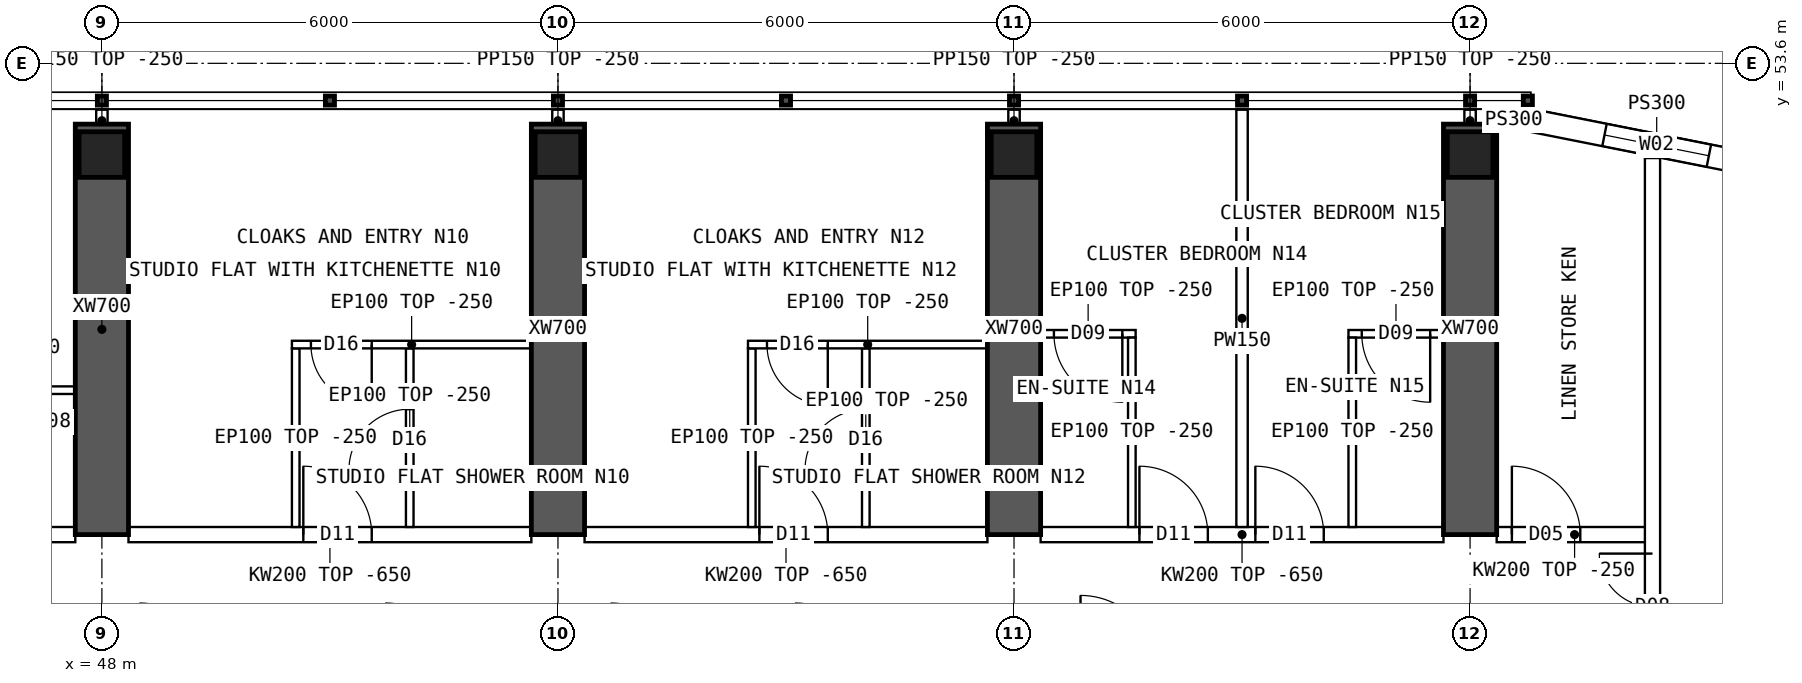
"""IFC4 building model, lengths in metres.
Left out: names, types, materials, properties, quantities, classifications, styles, units other than length and angle.
Written with IfcOpenShell. Run it as: python <this file> out.ifc"""

import sys

from ifc_helpers import new_model, si_unit, direction, frame, frame_2d, origin, origin_2d, place, context, subcontext, project, spatial, polyline, rectangle, hollow_rectangle, outline, extrude, element, fill, save


model = new_model("IFC4")
c1 = context("Model", 3, precision=1e-05, world=origin(), true_north=direction((0.0, 1.0)))
c2 = subcontext(c1, "Body", "Model", "MODEL_VIEW")
j1 = project(units=[si_unit("LENGTHUNIT", "METRE"), si_unit("PLANEANGLEUNIT", "RADIAN")], contexts=[c1])
p1 = place(None, origin())
s1 = spatial("IfcSite", under=j1, at=p1, CompositionType="ELEMENT")
p2 = place(p1, origin())
s2 = spatial("IfcBuilding", under=s1, at=p2, CompositionType="ELEMENT")
p3 = place(p2, frame((0.0, 0.0, 246.55)))
s3 = spatial("IfcBuildingStorey", under=s2, at=p3, CompositionType="ELEMENT", Elevation=246.55)
for number, where, z_axis, x_axis in (
    (1, (48.0, 52.4, 0.0), (0.0, 0.0, 1.0), (1.0, 0.0, 0.0)),
    (2, (54.0, 52.4, 0.0), (0.0, 0.0, 1.0), (1.0, 0.0, 0.0)),
    (3, (60.0, 52.4, 0.0), (0.0, 0.0, 1.0), (1.0, 0.0, 0.0)),
    (4, (66.0, 52.4, 0.0), (0.0, 0.0, 1.0), (1.0, 0.0, 0.0)),
):
    element("IfcColumn", number, at=place(p3, frame(where, z_axis=z_axis, x_axis=x_axis)), inside=s3, PredefinedType="COLUMN", context=c2, shape_type="SweptSolid", body=[
        extrude(hollow_rectangle(XDim=0.6, YDim=0.6, WallThickness=0.06, at=origin_2d()), origin(), (0.0, 0.0, 1.0), 3.75),
    ])
for number, where, z_axis, x_axis in (
    (5, (48.0, 47.4, 0.0), (0.0, 0.0, 1.0), (0.0, 1.0, 0.0)),
    (6, (54.0, 47.4, 0.0), (0.0, 0.0, 1.0), (0.0, 1.0, 0.0)),
    (7, (60.0, 47.4, 0.0), (0.0, 0.0, 1.0), (0.0, 1.0, 0.0)),
    (8, (66.0, 47.4, 0.0), (0.0, 0.0, 1.0), (0.0, 1.0, 0.0)),
):
    element("IfcWall", number, at=place(p3, frame(where, z_axis=z_axis, x_axis=x_axis)), inside=s3, PredefinedType="SHEAR", context=c2, shape_type="SweptSolid", body=[
        extrude(rectangle(XDim=5.4, YDim=0.7, at=frame_2d((2.7, 0.0))), origin(), (0.0, 0.0, 1.0), 3.75),
    ])
p4 = place(p3, frame((70.11, 52.192, 0.0), z_axis=(0.0, 0.0, 1.0), x_axis=(-0.98078325777, 0.195100490205, 0.0)))
e9 = element("IfcWall", 9, at=p4, inside=s3, PredefinedType="SOLIDWALL", context=c2, shape_type="SweptSolid", body=[
    extrude(outline(polyline([(-0.03, -0.15), (3.405, -0.15), (3.345, 0.15), (0.03, 0.15), (-0.03, -0.15)])), origin(), (0.0, 0.0, 1.0), 3.5),
])
p5 = place(p4, frame((0.988, 0.0, 0.9)))
e10 = element("IfcOpeningElement", 10, at=p5, cuts=e9, PredefinedType="OPENING", context=c2, shape_type="SweptSolid", body=[
    extrude(rectangle(XDim=1.4, YDim=1.8, at=frame_2d((0.7, 0.9))), frame((0.0, 0.16, 0.0), z_axis=(0.0, -1.0, 0.0), x_axis=(1.0, 0.0, 0.0)), (0.0, 0.0, 1.0), 0.32),
])
p6 = place(p3, frame((66.8, 52.85, 0.0), z_axis=(0.0, 0.0, 1.0), x_axis=(-1.0, 0.0, 0.0)))
e11 = element("IfcWall", 11, at=p6, inside=s3, PredefinedType="SOLIDWALL", context=c2, shape_type="SweptSolid", body=[
    extrude(rectangle(XDim=0.45, YDim=0.3, at=frame_2d((0.225, 0.0))), origin(), (0.0, 0.0, 1.0), 3.5),
])
p7 = place(p3, frame((42.35, 47.4, 0.0), z_axis=(0.0, 0.0, 1.0), x_axis=(1.0, 0.0, 0.0)))
e12 = element("IfcWall", 12, at=p7, inside=s3, PredefinedType="SOLIDWALL", context=c2, shape_type="SweptSolid", body=[
    extrude(outline(polyline([(0.0, 0.0), (5.3, 0.0), (5.3, 3.1), (0.0, 3.1), (0.0, 0.0)])), frame((0.0, 0.1, 0.0), z_axis=(0.0, -1.0, 0.0), x_axis=(1.0, 0.0, 0.0)), (0.0, 0.0, 1.0), 0.2),
])
p8 = place(p7, frame((0.1, 0.0, 0.0)))
e13 = element("IfcOpeningElement", 13, at=p8, cuts=e12, PredefinedType="OPENING", context=c2, shape_type="SweptSolid", body=[
    extrude(rectangle(XDim=0.9, YDim=2.1, at=frame_2d((0.45, 1.05))), frame((0.0, 0.11, 0.0), z_axis=(0.0, -1.0, 0.0), x_axis=(1.0, 0.0, 0.0)), (0.0, 0.0, 1.0), 0.22),
])
p9 = place(p3, frame((48.35, 47.4, 0.0), z_axis=(0.0, 0.0, 1.0), x_axis=(1.0, 0.0, 0.0)))
e14 = element("IfcWall", 14, at=p9, inside=s3, PredefinedType="SOLIDWALL", context=c2, shape_type="SweptSolid", body=[
    extrude(outline(polyline([(0.0, 0.0), (5.3, 0.0), (5.3, 3.1), (0.0, 3.1), (0.0, 0.0)])), frame((0.0, 0.1, 0.0), z_axis=(0.0, -1.0, 0.0), x_axis=(1.0, 0.0, 0.0)), (0.0, 0.0, 1.0), 0.2),
])
p10 = place(p9, frame((2.3, 0.0, 0.0)))
e15 = element("IfcOpeningElement", 15, at=p10, cuts=e14, PredefinedType="OPENING", context=c2, shape_type="SweptSolid", body=[
    extrude(rectangle(XDim=0.9, YDim=2.1, at=frame_2d((0.45, 1.05))), frame((0.0, 0.11, 0.0), z_axis=(0.0, -1.0, 0.0), x_axis=(1.0, 0.0, 0.0)), (0.0, 0.0, 1.0), 0.22),
])
p11 = place(p3, frame((54.35, 47.4, 0.0), z_axis=(0.0, 0.0, 1.0), x_axis=(1.0, 0.0, 0.0)))
e16 = element("IfcWall", 16, at=p11, inside=s3, PredefinedType="SOLIDWALL", context=c2, shape_type="SweptSolid", body=[
    extrude(outline(polyline([(0.0, 0.0), (5.3, 0.0), (5.3, 3.1), (0.0, 3.1), (0.0, 0.0)])), frame((0.0, 0.1, 0.0), z_axis=(0.0, -1.0, 0.0), x_axis=(1.0, 0.0, 0.0)), (0.0, 0.0, 1.0), 0.2),
])
p12 = place(p11, frame((2.3, 0.0, 0.0)))
e17 = element("IfcOpeningElement", 17, at=p12, cuts=e16, PredefinedType="OPENING", context=c2, shape_type="SweptSolid", body=[
    extrude(rectangle(XDim=0.9, YDim=2.1, at=frame_2d((0.45, 1.05))), frame((0.0, 0.11, 0.0), z_axis=(0.0, -1.0, 0.0), x_axis=(1.0, 0.0, 0.0)), (0.0, 0.0, 1.0), 0.22),
])
p13 = place(p3, frame((60.35, 47.4, 0.0), z_axis=(0.0, 0.0, 1.0), x_axis=(1.0, 0.0, 0.0)))
e18 = element("IfcWall", 18, at=p13, inside=s3, PredefinedType="SOLIDWALL", context=c2, shape_type="SweptSolid", body=[
    extrude(outline(polyline([(0.0, 0.0), (5.3, 0.0), (5.3, 3.1), (0.0, 3.1), (0.0, 0.0)])), frame((0.0, 0.1, 0.0), z_axis=(0.0, -1.0, 0.0), x_axis=(1.0, 0.0, 0.0)), (0.0, 0.0, 1.0), 0.2),
])
p14 = place(p13, frame((1.3, 0.0, 0.0)))
e19 = element("IfcOpeningElement", 19, at=p14, cuts=e18, PredefinedType="OPENING", context=c2, shape_type="SweptSolid", body=[
    extrude(rectangle(XDim=0.9, YDim=2.1, at=frame_2d((0.45, 1.05))), frame((0.0, 0.11, 0.0), z_axis=(0.0, -1.0, 0.0), x_axis=(1.0, 0.0, 0.0)), (0.0, 0.0, 1.0), 0.22),
])
p15 = place(p13, frame((2.825, 0.0, 0.0)))
e20 = element("IfcOpeningElement", 20, at=p15, cuts=e18, PredefinedType="OPENING", context=c2, shape_type="SweptSolid", body=[
    extrude(rectangle(XDim=0.9, YDim=2.1, at=frame_2d((0.45, 1.05))), frame((0.0, 0.11, 0.0), z_axis=(0.0, -1.0, 0.0), x_axis=(1.0, 0.0, 0.0)), (0.0, 0.0, 1.0), 0.22),
])
p16 = place(p3, frame((66.35, 47.4, 0.0), z_axis=(0.0, 0.0, 1.0), x_axis=(1.0, 0.0, 0.0)))
e21 = element("IfcWall", 21, at=p16, inside=s3, PredefinedType="SOLIDWALL", context=c2, shape_type="SweptSolid", body=[
    extrude(rectangle(XDim=2.05, YDim=0.2, at=frame_2d((1.025, 0.0))), origin(), (0.0, 0.0, 1.0), 3.5),
])
p17 = place(p16, frame((0.2, 0.0, 0.0)))
e22 = element("IfcOpeningElement", 22, at=p17, cuts=e21, PredefinedType="OPENING", context=c2, shape_type="SweptSolid", body=[
    extrude(rectangle(XDim=0.9, YDim=2.1, at=frame_2d((0.45, 1.05))), frame((0.0, 0.11, 0.0), z_axis=(0.0, -1.0, 0.0), x_axis=(1.0, 0.0, 0.0)), (0.0, 0.0, 1.0), 0.22),
])
p18 = place(p3, frame((45.1, 49.3, 0.0), z_axis=(0.0, 0.0, 1.0), x_axis=(1.0, 0.0, 0.0)))
e23 = element("IfcWall", 23, at=p18, inside=s3, PredefinedType="PARTITIONING", context=c2, shape_type="SweptSolid", body=[
    extrude(rectangle(XDim=2.55, YDim=0.1, at=frame_2d((1.275, 0.0))), origin(), (0.0, 0.0, 1.0), 3.5),
])
p19 = place(p18, frame((0.825, 0.0, 0.0)))
e24 = element("IfcOpeningElement", 24, at=p19, cuts=e23, PredefinedType="OPENING", context=c2, shape_type="SweptSolid", body=[
    extrude(rectangle(XDim=0.9, YDim=2.1, at=frame_2d((0.45, 1.05))), frame((0.0, 0.06, 0.0), z_axis=(0.0, -1.0, 0.0), x_axis=(1.0, 0.0, 0.0)), (0.0, 0.0, 1.0), 0.12),
])
p20 = place(p3, frame((50.5, 49.9, 0.0), z_axis=(0.0, 0.0, 1.0), x_axis=(1.0, 0.0, 0.0)))
e25 = element("IfcWall", 25, at=p20, inside=s3, PredefinedType="PARTITIONING", context=c2, shape_type="SweptSolid", body=[
    extrude(rectangle(XDim=3.15, YDim=0.1, at=frame_2d((1.575, 0.0))), origin(), (0.0, 0.0, 1.0), 3.5),
])
p21 = place(p20, frame((0.25, 0.0, 0.0)))
e26 = element("IfcOpeningElement", 26, at=p21, cuts=e25, PredefinedType="OPENING", context=c2, shape_type="SweptSolid", body=[
    extrude(rectangle(XDim=0.8, YDim=2.1, at=frame_2d((0.4, 1.05))), frame((0.0, 0.06, 0.0), z_axis=(0.0, -1.0, 0.0), x_axis=(1.0, 0.0, 0.0)), (0.0, 0.0, 1.0), 0.12),
])
p22 = place(p3, frame((50.55, 49.85, 0.0), z_axis=(0.0, 0.0, 1.0), x_axis=(0.0, -1.0, 0.0)))
e27 = element("IfcWall", 27, at=p22, inside=s3, PredefinedType="PARTITIONING", context=c2, shape_type="SweptSolid", body=[
    extrude(outline(polyline([(0.0, 0.0), (2.35, 0.0), (2.35, 3.1), (2.302, 3.1), (2.3, 3.5), (0.0, 3.5), (0.0, 0.0)])), frame((0.0, 0.05, 0.0), z_axis=(0.0, -1.0, 0.0), x_axis=(1.0, 0.0, 0.0)), (0.0, 0.0, 1.0), 0.1),
])
p23 = place(p3, frame((52.05, 49.85, 0.0), z_axis=(0.0, 0.0, 1.0), x_axis=(0.0, -1.0, 0.0)))
e28 = element("IfcWall", 28, at=p23, inside=s3, PredefinedType="PARTITIONING", context=c2, shape_type="SweptSolid", body=[
    extrude(outline(polyline([(0.0, 0.0), (2.35, 0.0), (2.35, 3.1), (2.302, 3.1), (2.3, 3.5), (0.0, 3.5), (0.0, 0.0)])), frame((0.0, 0.05, 0.0), z_axis=(0.0, -1.0, 0.0), x_axis=(1.0, 0.0, 0.0)), (0.0, 0.0, 1.0), 0.1),
])
p24 = place(p23, frame((0.8, 0.0, 0.0)))
e29 = element("IfcOpeningElement", 29, at=p24, cuts=e28, PredefinedType="OPENING", context=c2, shape_type="SweptSolid", body=[
    extrude(rectangle(XDim=0.8, YDim=2.1, at=frame_2d((0.4, 1.05))), frame((0.0, 0.06, 0.0), z_axis=(0.0, -1.0, 0.0), x_axis=(1.0, 0.0, 0.0)), (0.0, 0.0, 1.0), 0.12),
])
p25 = place(p3, frame((56.5, 49.9, 0.0), z_axis=(0.0, 0.0, 1.0), x_axis=(1.0, 0.0, 0.0)))
e30 = element("IfcWall", 30, at=p25, inside=s3, PredefinedType="PARTITIONING", context=c2, shape_type="SweptSolid", body=[
    extrude(rectangle(XDim=3.15, YDim=0.1, at=frame_2d((1.575, 0.0))), origin(), (0.0, 0.0, 1.0), 3.5),
])
p26 = place(p25, frame((0.25, 0.0, 0.0)))
e31 = element("IfcOpeningElement", 31, at=p26, cuts=e30, PredefinedType="OPENING", context=c2, shape_type="SweptSolid", body=[
    extrude(rectangle(XDim=0.8, YDim=2.1, at=frame_2d((0.4, 1.05))), frame((0.0, 0.06, 0.0), z_axis=(0.0, -1.0, 0.0), x_axis=(1.0, 0.0, 0.0)), (0.0, 0.0, 1.0), 0.12),
])
p27 = place(p3, frame((56.55, 49.85, 0.0), z_axis=(0.0, 0.0, 1.0), x_axis=(0.0, -1.0, 0.0)))
e32 = element("IfcWall", 32, at=p27, inside=s3, PredefinedType="PARTITIONING", context=c2, shape_type="SweptSolid", body=[
    extrude(outline(polyline([(0.0, 0.0), (2.35, 0.0), (2.35, 3.1), (2.302, 3.1), (2.3, 3.5), (0.0, 3.5), (0.0, 0.0)])), frame((0.0, 0.05, 0.0), z_axis=(0.0, -1.0, 0.0), x_axis=(1.0, 0.0, 0.0)), (0.0, 0.0, 1.0), 0.1),
])
p28 = place(p3, frame((58.05, 49.85, 0.0), z_axis=(0.0, 0.0, 1.0), x_axis=(0.0, -1.0, 0.0)))
e33 = element("IfcWall", 33, at=p28, inside=s3, PredefinedType="PARTITIONING", context=c2, shape_type="SweptSolid", body=[
    extrude(outline(polyline([(0.0, 0.0), (2.35, 0.0), (2.35, 3.1), (2.302, 3.1), (2.3, 3.5), (0.0, 3.5), (0.0, 0.0)])), frame((0.0, 0.05, 0.0), z_axis=(0.0, -1.0, 0.0), x_axis=(1.0, 0.0, 0.0)), (0.0, 0.0, 1.0), 0.1),
])
p29 = place(p28, frame((0.8, 0.0, 0.0)))
e34 = element("IfcOpeningElement", 34, at=p29, cuts=e33, PredefinedType="OPENING", context=c2, shape_type="SweptSolid", body=[
    extrude(rectangle(XDim=0.8, YDim=2.1, at=frame_2d((0.4, 1.05))), frame((0.0, 0.06, 0.0), z_axis=(0.0, -1.0, 0.0), x_axis=(1.0, 0.0, 0.0)), (0.0, 0.0, 1.0), 0.12),
])
p30 = place(p3, frame((63.0, 52.99, 0.0), z_axis=(0.0, 0.0, 1.0), x_axis=(0.0, -1.0, 0.0)))
e35 = element("IfcWall", 35, at=p30, inside=s3, PredefinedType="PARTITIONING", context=c2, shape_type="SweptSolid", body=[
    extrude(outline(polyline([(0.0, 0.0), (5.49, 0.0), (5.49, 3.1), (5.442, 3.1), (5.44, 3.5), (0.792, 3.5), (0.79, 3.1), (0.392, 3.1), (0.39, 3.5), (0.0, 3.5), (0.0, 0.0)])), frame((0.0, 0.075, 0.0), z_axis=(0.0, -1.0, 0.0), x_axis=(1.0, 0.0, 0.0)), (0.0, 0.0, 1.0), 0.15),
])
p31 = place(p3, frame((60.35, 50.042, 0.0), z_axis=(0.0, 0.0, 1.0), x_axis=(1.0, 0.0, 0.0)))
e36 = element("IfcWall", 36, at=p31, inside=s3, PredefinedType="PARTITIONING", context=c2, shape_type="SweptSolid", body=[
    extrude(rectangle(XDim=1.25, YDim=0.1, at=frame_2d((0.625, 0.0))), origin(), (0.0, 0.0, 1.0), 3.5),
])
p32 = place(p31, frame((0.175, 0.0, 0.0)))
e37 = element("IfcOpeningElement", 37, at=p32, cuts=e36, PredefinedType="OPENING", context=c2, shape_type="SweptSolid", body=[
    extrude(rectangle(XDim=0.9, YDim=2.1, at=frame_2d((0.45, 1.05))), frame((0.0, 0.06, 0.0), z_axis=(0.0, -1.0, 0.0), x_axis=(1.0, 0.0, 0.0)), (0.0, 0.0, 1.0), 0.12),
])
p33 = place(p3, frame((61.55, 49.992, 0.0), z_axis=(0.0, 0.0, 1.0), x_axis=(0.0, -1.0, 0.0)))
e38 = element("IfcWall", 38, at=p33, inside=s3, PredefinedType="PARTITIONING", context=c2, shape_type="SweptSolid", body=[
    extrude(outline(polyline([(0.0, 0.0), (2.492, 0.0), (2.492, 3.1), (2.444, 3.1), (2.442, 3.5), (0.0, 3.5), (0.0, 0.0)])), frame((0.0, 0.05, 0.0), z_axis=(0.0, -1.0, 0.0), x_axis=(1.0, 0.0, 0.0)), (0.0, 0.0, 1.0), 0.1),
])
p34 = place(p3, frame((64.4, 50.042, 0.0), z_axis=(0.0, 0.0, 1.0), x_axis=(1.0, 0.0, 0.0)))
e39 = element("IfcWall", 39, at=p34, inside=s3, PredefinedType="PARTITIONING", context=c2, shape_type="SweptSolid", body=[
    extrude(rectangle(XDim=1.25, YDim=0.1, at=frame_2d((0.625, 0.0))), origin(), (0.0, 0.0, 1.0), 3.5),
])
p35 = place(p34, frame((0.175, 0.0, 0.0)))
e40 = element("IfcOpeningElement", 40, at=p35, cuts=e39, PredefinedType="OPENING", context=c2, shape_type="SweptSolid", body=[
    extrude(rectangle(XDim=0.9, YDim=2.1, at=frame_2d((0.45, 1.05))), frame((0.0, 0.06, 0.0), z_axis=(0.0, -1.0, 0.0), x_axis=(1.0, 0.0, 0.0)), (0.0, 0.0, 1.0), 0.12),
])
p36 = place(p3, frame((64.45, 49.992, 0.0), z_axis=(0.0, 0.0, 1.0), x_axis=(0.0, -1.0, 0.0)))
e41 = element("IfcWall", 41, at=p36, inside=s3, PredefinedType="PARTITIONING", context=c2, shape_type="SweptSolid", body=[
    extrude(outline(polyline([(0.0, 0.0), (2.492, 0.0), (2.492, 3.1), (2.444, 3.1), (2.442, 3.5), (0.0, 3.5), (0.0, 0.0)])), frame((0.0, 0.05, 0.0), z_axis=(0.0, -1.0, 0.0), x_axis=(1.0, 0.0, 0.0)), (0.0, 0.0, 1.0), 0.1),
])
p37 = place(p3, frame((68.4, 11.646, 0.0), z_axis=(0.0, 0.0, 1.0), x_axis=(0.0, 1.0, 0.0)))
e42 = element("IfcWall", 42, at=p37, inside=s3, PredefinedType="SOLIDWALL", context=c2, shape_type="SweptSolid", body=[
    extrude(rectangle(XDim=40.708, YDim=0.2, at=frame_2d((20.354, 0.0))), origin(), (0.0, 0.0, 1.0), 3.5),
])
p38 = place(p37, frame((5.104, 0.0, 0.0)))
e43 = element("IfcOpeningElement", 43, at=p38, cuts=e42, PredefinedType="OPENING", context=c2, shape_type="SweptSolid", body=[
    extrude(rectangle(XDim=1.4, YDim=2.1, at=frame_2d((0.7, 1.05))), frame((0.0, 0.11, 0.0), z_axis=(0.0, -1.0, 0.0), x_axis=(1.0, 0.0, 0.0)), (0.0, 0.0, 1.0), 0.22),
])
p39 = place(p37, frame((34.104, 0.0, 0.0)))
e44 = element("IfcOpeningElement", 44, at=p39, cuts=e42, PredefinedType="OPENING", context=c2, shape_type="SweptSolid", body=[
    extrude(rectangle(XDim=1.4, YDim=2.1, at=frame_2d((0.7, 1.05))), frame((0.0, 0.11, 0.0), z_axis=(0.0, -1.0, 0.0), x_axis=(1.0, 0.0, 0.0)), (0.0, 0.0, 1.0), 0.22),
])
for number, where, z_axis, x_axis in (
    (45, (48.0, 52.7, 0.0), (0.0, 0.0, 1.0), (0.0, 1.0, 0.0)),
    (46, (54.0, 52.7, 0.0), (0.0, 0.0, 1.0), (0.0, 1.0, 0.0)),
    (47, (60.0, 52.7, 0.0), (0.0, 0.0, 1.0), (0.0, 1.0, 0.0)),
    (48, (66.0, 52.7, 0.0), (0.0, 0.0, 1.0), (0.0, 1.0, 0.0)),
):
    element("IfcWall", number, at=place(p3, frame(where, z_axis=z_axis, x_axis=x_axis)), inside=s3, PredefinedType="PARTITIONING", context=c2, shape_type="SweptSolid", body=[
        extrude(rectangle(XDim=0.29, YDim=0.15, at=frame_2d((0.145, 0.0))), origin(), (0.0, 0.0, 1.0), 3.5),
    ])
p40 = place(p5, origin())
e49 = element("IfcWindow", 49, at=p40, inside=s3, PartitioningType="SINGLE_PANEL", PredefinedType="WINDOW", context=c2, shape_type="SweptSolid", body=[
    extrude(rectangle(XDim=1.4, YDim=1.8, at=frame_2d((0.7, 0.9))), frame((0.0, 0.03, 0.0), z_axis=(0.0, -1.0, 0.0), x_axis=(1.0, 0.0, 0.0)), (0.0, 0.0, 1.0), 0.06),
])
fill(e10, e49)
p41 = place(p21, origin())
e50 = element("IfcDoor", 50, at=p41, inside=s3, OperationType="SINGLE_SWING_RIGHT", PredefinedType="DOOR", context=c2, shape_type="SweptSolid", body=[
    extrude(rectangle(XDim=0.8, YDim=2.1, at=frame_2d((0.4, 1.05))), frame((0.0, 0.025, 0.0), z_axis=(0.0, -1.0, 0.0), x_axis=(1.0, 0.0, 0.0)), (0.0, 0.0, 1.0), 0.05),
])
fill(e26, e50)
p42 = place(p24, origin())
e51 = element("IfcDoor", 51, at=p42, inside=s3, OperationType="SINGLE_SWING_RIGHT", PredefinedType="DOOR", context=c2, shape_type="SweptSolid", body=[
    extrude(rectangle(XDim=0.8, YDim=2.1, at=frame_2d((0.4, 1.05))), frame((0.0, 0.025, 0.0), z_axis=(0.0, -1.0, 0.0), x_axis=(1.0, 0.0, 0.0)), (0.0, 0.0, 1.0), 0.05),
])
fill(e29, e51)
p43 = place(p10, origin())
e52 = element("IfcDoor", 52, at=p43, inside=s3, OperationType="SINGLE_SWING_LEFT", PredefinedType="DOOR", context=c2, shape_type="SweptSolid", body=[
    extrude(rectangle(XDim=0.9, YDim=2.1, at=frame_2d((0.45, 1.05))), frame((0.0, 0.025, 0.0), z_axis=(0.0, -1.0, 0.0), x_axis=(1.0, 0.0, 0.0)), (0.0, 0.0, 1.0), 0.05),
])
fill(e15, e52)
p44 = place(p26, origin())
e53 = element("IfcDoor", 53, at=p44, inside=s3, OperationType="SINGLE_SWING_RIGHT", PredefinedType="DOOR", context=c2, shape_type="SweptSolid", body=[
    extrude(rectangle(XDim=0.8, YDim=2.1, at=frame_2d((0.4, 1.05))), frame((0.0, 0.025, 0.0), z_axis=(0.0, -1.0, 0.0), x_axis=(1.0, 0.0, 0.0)), (0.0, 0.0, 1.0), 0.05),
])
fill(e31, e53)
p45 = place(p29, origin())
e54 = element("IfcDoor", 54, at=p45, inside=s3, OperationType="SINGLE_SWING_RIGHT", PredefinedType="DOOR", context=c2, shape_type="SweptSolid", body=[
    extrude(rectangle(XDim=0.8, YDim=2.1, at=frame_2d((0.4, 1.05))), frame((0.0, 0.025, 0.0), z_axis=(0.0, -1.0, 0.0), x_axis=(1.0, 0.0, 0.0)), (0.0, 0.0, 1.0), 0.05),
])
fill(e34, e54)
p46 = place(p12, origin())
e55 = element("IfcDoor", 55, at=p46, inside=s3, OperationType="SINGLE_SWING_LEFT", PredefinedType="DOOR", context=c2, shape_type="SweptSolid", body=[
    extrude(rectangle(XDim=0.9, YDim=2.1, at=frame_2d((0.45, 1.05))), frame((0.0, 0.025, 0.0), z_axis=(0.0, -1.0, 0.0), x_axis=(1.0, 0.0, 0.0)), (0.0, 0.0, 1.0), 0.05),
])
fill(e17, e55)
p47 = place(p32, origin())
e56 = element("IfcDoor", 56, at=p47, inside=s3, OperationType="SINGLE_SWING_RIGHT", PredefinedType="DOOR", context=c2, shape_type="SweptSolid", body=[
    extrude(rectangle(XDim=0.9, YDim=2.1, at=frame_2d((0.45, 1.05))), frame((0.0, 0.025, 0.0), z_axis=(0.0, -1.0, 0.0), x_axis=(1.0, 0.0, 0.0)), (0.0, 0.0, 1.0), 0.05),
])
fill(e37, e56)
p48 = place(p14, origin())
e57 = element("IfcDoor", 57, at=p48, inside=s3, OperationType="SINGLE_SWING_LEFT", PredefinedType="DOOR", context=c2, shape_type="SweptSolid", body=[
    extrude(rectangle(XDim=0.9, YDim=2.1, at=frame_2d((0.45, 1.05))), frame((0.0, 0.025, 0.0), z_axis=(0.0, -1.0, 0.0), x_axis=(1.0, 0.0, 0.0)), (0.0, 0.0, 1.0), 0.05),
])
fill(e19, e57)
p49 = place(p35, origin())
e58 = element("IfcDoor", 58, at=p49, inside=s3, OperationType="SINGLE_SWING_RIGHT", PredefinedType="DOOR", context=c2, shape_type="SweptSolid", body=[
    extrude(rectangle(XDim=0.9, YDim=2.1, at=frame_2d((0.45, 1.05))), frame((0.0, 0.025, 0.0), z_axis=(0.0, -1.0, 0.0), x_axis=(1.0, 0.0, 0.0)), (0.0, 0.0, 1.0), 0.05),
])
fill(e40, e58)
p50 = place(p15, origin())
e59 = element("IfcDoor", 59, at=p50, inside=s3, OperationType="SINGLE_SWING_LEFT", PredefinedType="DOOR", context=c2, shape_type="SweptSolid", body=[
    extrude(rectangle(XDim=0.9, YDim=2.1, at=frame_2d((0.45, 1.05))), frame((0.0, 0.025, 0.0), z_axis=(0.0, -1.0, 0.0), x_axis=(1.0, 0.0, 0.0)), (0.0, 0.0, 1.0), 0.05),
])
fill(e20, e59)
p51 = place(p39, origin())
e60 = element("IfcDoor", 60, at=p51, inside=s3, OperationType="DOUBLE_DOOR_SINGLE_SWING", PredefinedType="DOOR", context=c2, shape_type="SweptSolid", body=[
    extrude(rectangle(XDim=1.4, YDim=2.1, at=frame_2d((0.7, 1.05))), frame((0.0, 0.025, 0.0), z_axis=(0.0, -1.0, 0.0), x_axis=(1.0, 0.0, 0.0)), (0.0, 0.0, 1.0), 0.05),
])
fill(e44, e60)
p52 = place(p17, origin())
e61 = element("IfcDoor", 61, at=p52, inside=s3, OperationType="SINGLE_SWING_LEFT", PredefinedType="DOOR", context=c2, shape_type="SweptSolid", body=[
    extrude(rectangle(XDim=0.9, YDim=2.1, at=frame_2d((0.45, 1.05))), frame((0.0, 0.025, 0.0), z_axis=(0.0, -1.0, 0.0), x_axis=(1.0, 0.0, 0.0)), (0.0, 0.0, 1.0), 0.05),
])
fill(e22, e61)
save(model, sys.argv[1])
